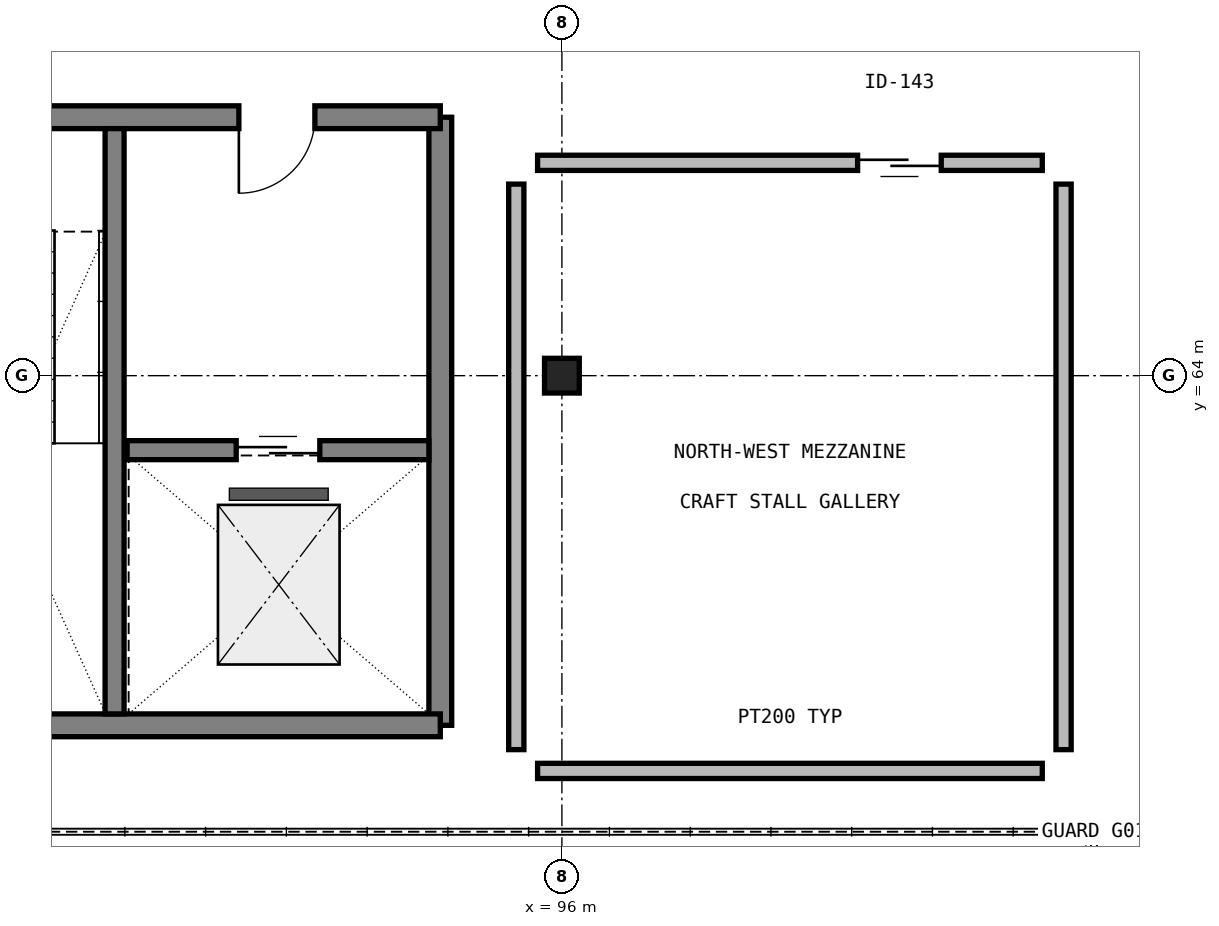
"""IFC4 building model, lengths in metres.
Left out: names, types, materials, properties, quantities, classifications, styles, units other than length and angle.
Written with IfcOpenShell. Run it as: python <this file> out.ifc"""

import sys

from ifc_helpers import new_model, si_unit, direction, frame, frame_2d, origin, origin_2d_with_axis, place, context, subcontext, project, spatial, rectangle, hollow_circle, extrude, element, fill, save


model = new_model("IFC4")
c1 = context("Model", 3, precision=1e-05, world=origin(), true_north=direction((0.0, 1.0)))
c2 = subcontext(c1, "Body", "Model", "MODEL_VIEW")
j1 = project(units=[si_unit("LENGTHUNIT", "METRE"), si_unit("PLANEANGLEUNIT", "RADIAN")], contexts=[c1])
p1 = place(None, origin())
s1 = spatial("IfcSite", under=j1, at=p1, CompositionType="ELEMENT")
p2 = place(p1, origin())
s2 = spatial("IfcBuilding", under=s1, at=p2, CompositionType="ELEMENT")
p3 = place(p2, frame((0.0, 0.0, 4.5)))
s3 = spatial("IfcBuildingStorey", under=s2, at=p3, CompositionType="ELEMENT", Elevation=4.5)
p4 = place(p3, frame((96.0, 64.0, 0.0), z_axis=(0.0, 0.0, 1.0), x_axis=(1.0, 0.0, 0.0)))
e1 = element("IfcColumn", 1, at=p4, inside=s3, PredefinedType="COLUMN", context=c2, shape_type="SweptSolid", body=[
    extrude(hollow_circle(Radius=0.229, WallThickness=0.013, at=origin_2d_with_axis()), origin(), (0.0, 0.0, 1.0), 3.9),
])
p5 = place(p3, frame((94.4, 59.4, 0.0), z_axis=(0.0, 0.0, 1.0), x_axis=(0.0, 1.0, 0.0)))
e2 = element("IfcWall", 2, at=p5, inside=s3, PredefinedType="SHEAR", context=c2, shape_type="SweptSolid", body=[
    extrude(rectangle(XDim=8.0, YDim=0.3, at=frame_2d((4.0, 0.0), x_axis=(1.0, 0.0))), origin(), (0.0, 0.0, 1.0), 3.9),
])
p6 = place(p3, frame((87.0, 59.4, 0.0), z_axis=(0.0, 0.0, 1.0), x_axis=(1.0, 0.0, 0.0)))
e3 = element("IfcWall", 3, at=p6, inside=s3, PredefinedType="SHEAR", context=c2, shape_type="SweptSolid", body=[
    extrude(rectangle(XDim=7.4, YDim=0.3, at=frame_2d((3.7, 0.0), x_axis=(1.0, 0.0))), origin(), (0.0, 0.0, 1.0), 3.9),
])
p7 = place(p3, frame((94.4, 67.4, 0.0), z_axis=(0.0, 0.0, 1.0), x_axis=(-1.0, 0.0, 0.0)))
e4 = element("IfcWall", 4, at=p7, inside=s3, PredefinedType="SHEAR", context=c2, shape_type="SweptSolid", body=[
    extrude(rectangle(XDim=7.4, YDim=0.3, at=frame_2d((3.7, 0.0), x_axis=(1.0, 0.0))), origin(), (0.0, 0.0, 1.0), 3.9),
])
p8 = place(p7, frame((1.65, 0.0, 0.0)))
e5 = element("IfcOpeningElement", 5, at=p8, cuts=e4, PredefinedType="OPENING", context=c2, shape_type="SweptSolid", body=[
    extrude(rectangle(XDim=1.0, YDim=2.15, at=frame_2d((0.5, 1.075), x_axis=(1.0, 0.0))), frame((0.0, 0.16, 0.0), z_axis=(0.0, -1.0, 0.0), x_axis=(1.0, 0.0, 0.0)), (0.0, 0.0, 1.0), 0.32),
])
p9 = place(p7, frame((5.3, 0.0, 0.0)))
e6 = element("IfcOpeningElement", 6, at=p9, cuts=e4, PredefinedType="OPENING", context=c2, shape_type="SweptSolid", body=[
    extrude(rectangle(XDim=1.0, YDim=2.15, at=frame_2d((0.5, 1.075), x_axis=(1.0, 0.0))), frame((0.0, 0.16, 0.0), z_axis=(0.0, -1.0, 0.0), x_axis=(1.0, 0.0, 0.0)), (0.0, 0.0, 1.0), 0.32),
])
p10 = place(p3, frame((90.115, 59.55, 0.0), z_axis=(0.0, 0.0, 1.0), x_axis=(0.0, 1.0, 0.0)))
e7 = element("IfcWall", 7, at=p10, inside=s3, PredefinedType="SHEAR", context=c2, shape_type="SweptSolid", body=[
    extrude(rectangle(XDim=7.7, YDim=0.25, at=frame_2d((3.85, 0.0), x_axis=(1.0, 0.0))), origin(), (0.0, 0.0, 1.0), 3.9),
])
p11 = place(p3, frame((90.28, 63.02, 0.0), z_axis=(0.0, 0.0, 1.0), x_axis=(1.0, 0.0, 0.0)))
e8 = element("IfcWall", 8, at=p11, inside=s3, PredefinedType="SHEAR", context=c2, shape_type="SweptSolid", body=[
    extrude(rectangle(XDim=3.97, YDim=0.25, at=frame_2d((1.985, 0.0), x_axis=(1.0, 0.0))), origin(), (0.0, 0.0, 1.0), 3.65),
])
p12 = place(p11, frame((1.435, 0.0, 0.0)))
e9 = element("IfcOpeningElement", 9, at=p12, cuts=e8, PredefinedType="OPENING", context=c2, shape_type="SweptSolid", body=[
    extrude(rectangle(XDim=1.1, YDim=2.15, at=frame_2d((0.55, 1.075), x_axis=(1.0, 0.0))), frame((0.0, 0.135, 0.0), z_axis=(0.0, -1.0, 0.0), x_axis=(1.0, 0.0, 0.0)), (0.0, 0.0, 1.0), 0.27),
])
p13 = place(p3, frame((95.68, 58.8, 0.0), z_axis=(0.0, 0.0, 1.0), x_axis=(1.0, 0.0, 0.0)))
e10 = element("IfcWall", 10, at=p13, inside=s3, PredefinedType="MOVABLE", context=c2, shape_type="SweptSolid", body=[
    extrude(rectangle(XDim=6.64, YDim=0.2, at=frame_2d((3.32, 0.0), x_axis=(1.0, 0.0))), origin(), (0.0, 0.0, 1.0), 3.03),
])
p14 = place(p3, frame((102.6, 59.08, 0.0), z_axis=(0.0, 0.0, 1.0), x_axis=(0.0, 1.0, 0.0)))
e11 = element("IfcWall", 11, at=p14, inside=s3, PredefinedType="MOVABLE", context=c2, shape_type="SweptSolid", body=[
    extrude(rectangle(XDim=7.44, YDim=0.2, at=frame_2d((3.72, 0.0), x_axis=(1.0, 0.0))), origin(), (0.0, 0.0, 1.0), 3.03),
])
p15 = place(p3, frame((102.32, 66.8, 0.0), z_axis=(0.0, 0.0, 1.0), x_axis=(-1.0, 0.0, 0.0)))
e12 = element("IfcWall", 12, at=p15, inside=s3, PredefinedType="MOVABLE", context=c2, shape_type="SweptSolid", body=[
    extrude(rectangle(XDim=6.64, YDim=0.2, at=frame_2d((3.32, 0.0), x_axis=(1.0, 0.0))), origin(), (0.0, 0.0, 1.0), 3.03),
])
p16 = place(p15, frame((1.33, 0.0, 0.0)))
e13 = element("IfcOpeningElement", 13, at=p16, cuts=e12, PredefinedType="OPENING", context=c2, shape_type="SweptSolid", body=[
    extrude(rectangle(XDim=1.1, YDim=2.15, at=frame_2d((0.55, 1.075), x_axis=(1.0, 0.0))), frame((0.0, 0.11, 0.0), z_axis=(0.0, -1.0, 0.0), x_axis=(1.0, 0.0, 0.0)), (0.0, 0.0, 1.0), 0.22),
])
p17 = place(p3, frame((95.4, 66.52, 0.0), z_axis=(0.0, 0.0, 1.0), x_axis=(0.0, -1.0, 0.0)))
e14 = element("IfcWall", 14, at=p17, inside=s3, PredefinedType="MOVABLE", context=c2, shape_type="SweptSolid", body=[
    extrude(rectangle(XDim=7.44, YDim=0.2, at=frame_2d((3.72, 0.0), x_axis=(1.0, 0.0))), origin(), (0.0, 0.0, 1.0), 3.03),
])
p18 = place(p8, origin())
e15 = element("IfcDoor", 15, at=p18, inside=s3, OperationType="SINGLE_SWING_RIGHT", PredefinedType="DOOR", context=c2, shape_type="SweptSolid", body=[
    extrude(rectangle(XDim=1.0, YDim=2.15, at=frame_2d((0.5, 1.075), x_axis=(1.0, 0.0))), frame((0.0, 0.025, 0.0), z_axis=(0.0, -1.0, 0.0), x_axis=(1.0, 0.0, 0.0)), (0.0, 0.0, 1.0), 0.05),
])
fill(e5, e15)
p19 = place(p12, origin())
e16 = element("IfcDoor", 16, at=p19, inside=s3, OperationType="SLIDING_TO_LEFT", PredefinedType="DOOR", context=c2, shape_type="SweptSolid", body=[
    extrude(rectangle(XDim=1.1, YDim=2.15, at=frame_2d((0.55, 1.075), x_axis=(1.0, 0.0))), frame((0.0, 0.025, 0.0), z_axis=(0.0, -1.0, 0.0), x_axis=(1.0, 0.0, 0.0)), (0.0, 0.0, 1.0), 0.05),
])
fill(e9, e16)
p20 = place(p16, origin())
e17 = element("IfcDoor", 17, at=p20, inside=s3, OperationType="SLIDING_TO_LEFT", PredefinedType="DOOR", context=c2, shape_type="SweptSolid", body=[
    extrude(rectangle(XDim=1.1, YDim=2.15, at=frame_2d((0.55, 1.075), x_axis=(1.0, 0.0))), frame((0.0, 0.025, 0.0), z_axis=(0.0, -1.0, 0.0), x_axis=(1.0, 0.0, 0.0)), (0.0, 0.0, 1.0), 0.05),
])
fill(e13, e17)
save(model, sys.argv[1])
